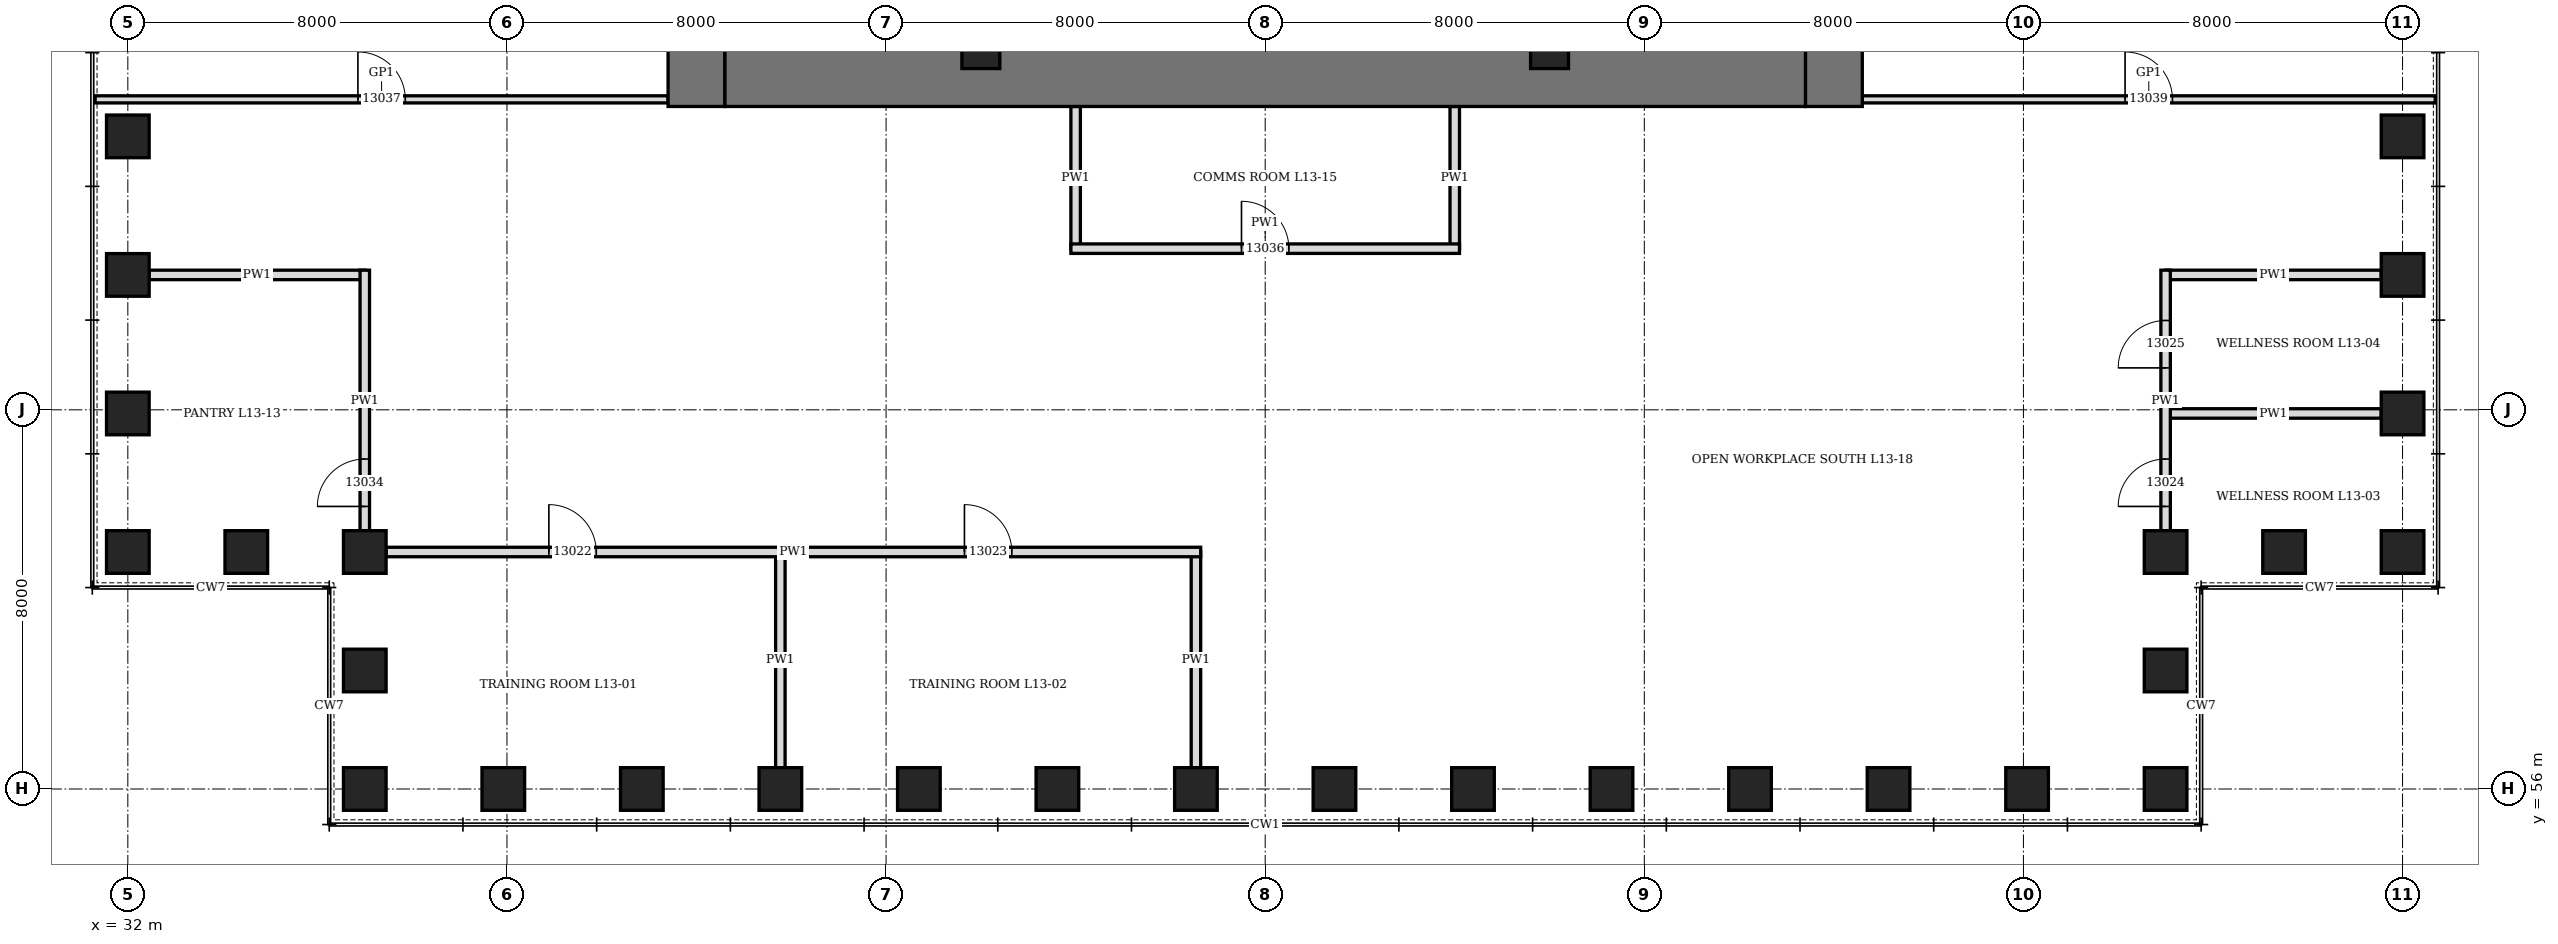
"""IFC4 building model, lengths in metres.
Left out: names, types, materials, properties, quantities, classifications, styles, units other than length and angle.
Written with IfcOpenShell. Run it as: python <this file> out.ifc"""

import sys

from ifc_helpers import new_model, si_unit, direction, frame, frame_2d, origin, origin_2d, place, context, subcontext, project, spatial, rectangle, hollow_rectangle, extrude, element, fill, save


model = new_model("IFC4")
c1 = context("Model", 3, precision=1e-05, world=origin(), true_north=direction((0.0, 1.0)))
c2 = subcontext(c1, "Body", "Model", "MODEL_VIEW")
j1 = project(units=[si_unit("LENGTHUNIT", "METRE"), si_unit("PLANEANGLEUNIT", "RADIAN")], contexts=[c1])
p1 = place(None, origin())
s1 = spatial("IfcSite", under=j1, at=p1, CompositionType="ELEMENT")
p2 = place(p1, origin())
s2 = spatial("IfcBuilding", under=s1, at=p2, CompositionType="ELEMENT")
p3 = place(p2, frame((0.0, 0.0, 64.3)))
s3 = spatial("IfcBuildingStorey", under=s2, at=p3, CompositionType="ELEMENT", Elevation=64.3)
for number, where, z_axis, x_axis in (
    (1, (37.0, 56.0, 0.0), (0.0, 0.0, 1.0), (1.0, 0.0, 0.0)),
    (2, (39.923, 56.0, 0.0), (0.0, 0.0, 1.0), (1.0, 0.0, 0.0)),
    (3, (42.846, 56.0, 0.0), (0.0, 0.0, 1.0), (1.0, 0.0, 0.0)),
    (4, (45.769, 56.0, 0.0), (0.0, 0.0, 1.0), (1.0, 0.0, 0.0)),
    (5, (48.692, 56.0, 0.0), (0.0, 0.0, 1.0), (1.0, 0.0, 0.0)),
    (6, (51.615, 56.0, 0.0), (0.0, 0.0, 1.0), (1.0, 0.0, 0.0)),
    (7, (54.539, 56.0, 0.0), (0.0, 0.0, 1.0), (1.0, 0.0, 0.0)),
    (8, (57.461, 56.0, 0.0), (0.0, 0.0, 1.0), (1.0, 0.0, 0.0)),
    (9, (60.385, 56.0, 0.0), (0.0, 0.0, 1.0), (1.0, 0.0, 0.0)),
    (10, (63.308, 56.0, 0.0), (0.0, 0.0, 1.0), (1.0, 0.0, 0.0)),
    (11, (66.231, 56.0, 0.0), (0.0, 0.0, 1.0), (1.0, 0.0, 0.0)),
    (12, (69.154, 56.0, 0.0), (0.0, 0.0, 1.0), (1.0, 0.0, 0.0)),
    (13, (72.077, 56.0, 0.0), (0.0, 0.0, 1.0), (1.0, 0.0, 0.0)),
    (14, (75.0, 56.0, 0.0), (0.0, 0.0, 1.0), (0.0, 1.0, 0.0)),
    (15, (75.0, 58.5, 0.0), (0.0, 0.0, 1.0), (0.0, 1.0, 0.0)),
    (16, (75.0, 61.0, 0.0), (0.0, 0.0, 1.0), (1.0, 0.0, 0.0)),
    (17, (77.5, 61.0, 0.0), (0.0, 0.0, 1.0), (1.0, 0.0, 0.0)),
    (18, (80.0, 61.0, 0.0), (0.0, 0.0, 1.0), (0.0, 1.0, 0.0)),
    (19, (80.0, 63.923, 0.0), (0.0, 0.0, 1.0), (0.0, 1.0, 0.0)),
    (20, (80.0, 66.846, 0.0), (0.0, 0.0, 1.0), (0.0, 1.0, 0.0)),
    (21, (80.0, 69.769, 0.0), (0.0, 0.0, 1.0), (0.0, 1.0, 0.0)),
    (22, (32.0, 69.769, 0.0), (0.0, 0.0, 1.0), (0.0, 1.0, 0.0)),
    (23, (32.0, 66.846, 0.0), (0.0, 0.0, 1.0), (0.0, 1.0, 0.0)),
    (24, (32.0, 63.923, 0.0), (0.0, 0.0, 1.0), (0.0, 1.0, 0.0)),
    (25, (32.0, 61.0, 0.0), (0.0, 0.0, 1.0), (1.0, 0.0, 0.0)),
    (26, (34.5, 61.0, 0.0), (0.0, 0.0, 1.0), (1.0, 0.0, 0.0)),
    (27, (37.0, 61.0, 0.0), (0.0, 0.0, 1.0), (0.0, 1.0, 0.0)),
    (28, (37.0, 58.5, 0.0), (0.0, 0.0, 1.0), (0.0, 1.0, 0.0)),
):
    element("IfcColumn", number, at=place(p3, frame(where, z_axis=z_axis, x_axis=x_axis)), inside=s3, PredefinedType="COLUMN", context=c2, shape_type="SweptSolid", body=[
        extrude(hollow_rectangle(XDim=0.9, YDim=0.9, WallThickness=0.12, at=origin_2d()), origin(), (0.0, 0.0, 1.0), 4.2),
    ])
p4 = place(p3, frame((44.0, 70.4, 0.0), z_axis=(0.0, 0.0, 1.0), x_axis=(0.0, 1.0, 0.0)))
e29 = element("IfcWall", 29, at=p4, inside=s3, PredefinedType="SHEAR", context=c2, shape_type="SweptSolid", body=[
    extrude(rectangle(XDim=19.2, YDim=1.2, at=frame_2d((9.6, 0.0))), origin(), (0.0, 0.0, 1.0), 4.2),
])
p5 = place(p4, frame((8.6, 0.0, 0.0)))
e30 = element("IfcOpeningElement", 30, at=p5, cuts=e29, PredefinedType="OPENING", context=c2, shape_type="SweptSolid", body=[
    extrude(rectangle(XDim=2.0, YDim=2.4, at=frame_2d((1.0, 1.2))), frame((0.0, 0.61, 0.0), z_axis=(0.0, -1.0, 0.0), x_axis=(1.0, 0.0, 0.0)), (0.0, 0.0, 1.0), 1.22),
])
p6 = place(p3, frame((68.0, 70.4, 0.0), z_axis=(0.0, 0.0, 1.0), x_axis=(0.0, 1.0, 0.0)))
e31 = element("IfcWall", 31, at=p6, inside=s3, PredefinedType="SHEAR", context=c2, shape_type="SweptSolid", body=[
    extrude(rectangle(XDim=19.2, YDim=1.2, at=frame_2d((9.6, 0.0))), origin(), (0.0, 0.0, 1.0), 4.2),
])
p7 = place(p6, frame((8.6, 0.0, 0.0)))
e32 = element("IfcOpeningElement", 32, at=p7, cuts=e31, PredefinedType="OPENING", context=c2, shape_type="SweptSolid", body=[
    extrude(rectangle(XDim=2.0, YDim=2.4, at=frame_2d((1.0, 1.2))), frame((0.0, 0.61, 0.0), z_axis=(0.0, -1.0, 0.0), x_axis=(1.0, 0.0, 0.0)), (0.0, 0.0, 1.0), 1.22),
])
p8 = place(p3, frame((44.6, 71.0, 0.0), z_axis=(0.0, 0.0, 1.0), x_axis=(1.0, 0.0, 0.0)))
e33 = element("IfcWall", 33, at=p8, inside=s3, PredefinedType="SHEAR", context=c2, shape_type="SweptSolid", body=[
    extrude(rectangle(XDim=22.8, YDim=1.2, at=frame_2d((11.4, 0.0))), origin(), (0.0, 0.0, 1.0), 4.2),
])
for number, where, z_axis, x_axis in (
    (34, (50.0, 71.6, 0.0), (0.0, 0.0, 1.0), (1.0, 0.0, 0.0)),
    (35, (62.0, 71.6, 0.0), (0.0, 0.0, 1.0), (1.0, 0.0, 0.0)),
):
    element("IfcColumn", number, at=place(p3, frame(where, z_axis=z_axis, x_axis=x_axis)), inside=s3, PredefinedType="COLUMN", context=c2, shape_type="SweptSolid", body=[
        extrude(hollow_rectangle(XDim=0.8, YDim=0.8, WallThickness=0.1, at=origin_2d()), origin(), (0.0, 0.0, 1.0), 4.2),
    ])
for number, where, z_axis, x_axis in (
    (36, (45.769, 56.45, 0.0), (0.0, 0.0, 1.0), (0.0, 1.0, 0.0)),
    (37, (54.539, 56.45, 0.0), (0.0, 0.0, 1.0), (0.0, 1.0, 0.0)),
):
    element("IfcWall", number, at=place(p3, frame(where, z_axis=z_axis, x_axis=x_axis)), inside=s3, PredefinedType="PARTITIONING", context=c2, shape_type="SweptSolid", body=[
        extrude(rectangle(XDim=4.55, YDim=0.2, at=frame_2d((2.275, 0.0))), origin(), (0.0, 0.0, 1.0), 3.278),
    ])
for number, where, z_axis, x_axis in (
    (38, (75.0, 63.923, 0.0), (0.0, 0.0, 1.0), (1.0, 0.0, 0.0)),
    (39, (75.0, 66.846, 0.0), (0.0, 0.0, 1.0), (1.0, 0.0, 0.0)),
    (40, (32.45, 66.846, 0.0), (0.0, 0.0, 1.0), (1.0, 0.0, 0.0)),
):
    element("IfcWall", number, at=place(p3, frame(where, z_axis=z_axis, x_axis=x_axis)), inside=s3, PredefinedType="PARTITIONING", context=c2, shape_type="SweptSolid", body=[
        extrude(rectangle(XDim=4.55, YDim=0.2, at=frame_2d((2.275, 0.0))), origin(), (0.0, 0.0, 1.0), 3.428),
    ])
for number, where, z_axis, x_axis in (
    (41, (52.0, 67.4, 0.0), (0.0, 0.0, 1.0), (0.0, 1.0, 0.0)),
    (42, (60.0, 67.4, 0.0), (0.0, 0.0, 1.0), (0.0, 1.0, 0.0)),
):
    element("IfcWall", number, at=place(p3, frame(where, z_axis=z_axis, x_axis=x_axis)), inside=s3, PredefinedType="PARTITIONING", context=c2, shape_type="SweptSolid", body=[
        extrude(rectangle(XDim=3.0, YDim=0.2, at=frame_2d((1.5, 0.0))), origin(), (0.0, 0.0, 1.0), 4.04),
    ])
p9 = place(p3, frame((37.45, 61.0, 0.0), z_axis=(0.0, 0.0, 1.0), x_axis=(1.0, 0.0, 0.0)))
e43 = element("IfcWall", 43, at=p9, inside=s3, PredefinedType="PARTITIONING", context=c2, shape_type="SweptSolid", body=[
    extrude(rectangle(XDim=17.188, YDim=0.2, at=frame_2d((8.594, 0.0))), origin(), (0.0, 0.0, 1.0), 4.04),
])
p10 = place(p9, frame((3.435, 0.0, 0.0)))
e44 = element("IfcOpeningElement", 44, at=p10, cuts=e43, PredefinedType="OPENING", context=c2, shape_type="SweptSolid", body=[
    extrude(rectangle(XDim=1.0, YDim=2.1, at=frame_2d((0.5, 1.05))), frame((0.0, 0.11, 0.0), z_axis=(0.0, -1.0, 0.0), x_axis=(1.0, 0.0, 0.0)), (0.0, 0.0, 1.0), 0.22),
])
p11 = place(p9, frame((12.204, 0.0, 0.0)))
e45 = element("IfcOpeningElement", 45, at=p11, cuts=e43, PredefinedType="OPENING", context=c2, shape_type="SweptSolid", body=[
    extrude(rectangle(XDim=1.0, YDim=2.1, at=frame_2d((0.5, 1.05))), frame((0.0, 0.11, 0.0), z_axis=(0.0, -1.0, 0.0), x_axis=(1.0, 0.0, 0.0)), (0.0, 0.0, 1.0), 0.22),
])
p12 = place(p3, frame((51.9, 67.4, 0.0), z_axis=(0.0, 0.0, 1.0), x_axis=(1.0, 0.0, 0.0)))
e46 = element("IfcWall", 46, at=p12, inside=s3, PredefinedType="PARTITIONING", context=c2, shape_type="SweptSolid", body=[
    extrude(rectangle(XDim=8.2, YDim=0.2, at=frame_2d((4.1, 0.0))), origin(), (0.0, 0.0, 1.0), 4.04),
])
p13 = place(p12, frame((3.6, 0.0, 0.0)))
e47 = element("IfcOpeningElement", 47, at=p13, cuts=e46, PredefinedType="OPENING", context=c2, shape_type="SweptSolid", body=[
    extrude(rectangle(XDim=1.0, YDim=2.1, at=frame_2d((0.5, 1.05))), frame((0.0, 0.11, 0.0), z_axis=(0.0, -1.0, 0.0), x_axis=(1.0, 0.0, 0.0)), (0.0, 0.0, 1.0), 0.22),
])
p14 = place(p3, frame((31.31, 70.55, 0.0), z_axis=(0.0, 0.0, 1.0), x_axis=(1.0, 0.0, 0.0)))
e48 = element("IfcWall", 48, at=p14, inside=s3, PredefinedType="PARTITIONING", context=c2, shape_type="SweptSolid", body=[
    extrude(rectangle(XDim=12.09, YDim=0.15, at=frame_2d((6.045, 0.0))), origin(), (0.0, 0.0, 1.0), 4.04),
])
p15 = place(p14, frame((5.545, 0.0, 0.0)))
e49 = element("IfcOpeningElement", 49, at=p15, cuts=e48, PredefinedType="OPENING", context=c2, shape_type="SweptSolid", body=[
    extrude(rectangle(XDim=1.0, YDim=2.4, at=frame_2d((0.5, 1.2))), frame((0.0, 0.085, 0.0), z_axis=(0.0, -1.0, 0.0), x_axis=(1.0, 0.0, 0.0)), (0.0, 0.0, 1.0), 0.17),
])
p16 = place(p3, frame((68.6, 70.55, 0.0), z_axis=(0.0, 0.0, 1.0), x_axis=(1.0, 0.0, 0.0)))
e50 = element("IfcWall", 50, at=p16, inside=s3, PredefinedType="PARTITIONING", context=c2, shape_type="SweptSolid", body=[
    extrude(rectangle(XDim=12.09, YDim=0.15, at=frame_2d((6.045, 0.0))), origin(), (0.0, 0.0, 1.0), 4.04),
])
p17 = place(p16, frame((5.545, 0.0, 0.0)))
e51 = element("IfcOpeningElement", 51, at=p17, cuts=e50, PredefinedType="OPENING", context=c2, shape_type="SweptSolid", body=[
    extrude(rectangle(XDim=1.0, YDim=2.4, at=frame_2d((0.5, 1.2))), frame((0.0, 0.085, 0.0), z_axis=(0.0, -1.0, 0.0), x_axis=(1.0, 0.0, 0.0)), (0.0, 0.0, 1.0), 0.17),
])
p18 = place(p3, frame((37.0, 61.45, 0.0), z_axis=(0.0, 0.0, 1.0), x_axis=(0.0, 1.0, 0.0)))
e52 = element("IfcWall", 52, at=p18, inside=s3, PredefinedType="PARTITIONING", context=c2, shape_type="SweptSolid", body=[
    extrude(rectangle(XDim=5.496, YDim=0.2, at=frame_2d((2.748, 0.0))), origin(), (0.0, 0.0, 1.0), 4.04),
])
p19 = place(p18, frame((0.511, 0.0, 0.0)))
e53 = element("IfcOpeningElement", 53, at=p19, cuts=e52, PredefinedType="OPENING", context=c2, shape_type="SweptSolid", body=[
    extrude(rectangle(XDim=1.0, YDim=2.1, at=frame_2d((0.5, 1.05))), frame((0.0, 0.11, 0.0), z_axis=(0.0, -1.0, 0.0), x_axis=(1.0, 0.0, 0.0)), (0.0, 0.0, 1.0), 0.22),
])
p20 = place(p3, frame((75.0, 61.45, 0.0), z_axis=(0.0, 0.0, 1.0), x_axis=(0.0, 1.0, 0.0)))
e54 = element("IfcWall", 54, at=p20, inside=s3, PredefinedType="PARTITIONING", context=c2, shape_type="SweptSolid", body=[
    extrude(rectangle(XDim=5.496, YDim=0.2, at=frame_2d((2.748, 0.0))), origin(), (0.0, 0.0, 1.0), 4.04),
])
p21 = place(p20, frame((0.511, 0.0, 0.0)))
e55 = element("IfcOpeningElement", 55, at=p21, cuts=e54, PredefinedType="OPENING", context=c2, shape_type="SweptSolid", body=[
    extrude(rectangle(XDim=1.0, YDim=2.1, at=frame_2d((0.5, 1.05))), frame((0.0, 0.11, 0.0), z_axis=(0.0, -1.0, 0.0), x_axis=(1.0, 0.0, 0.0)), (0.0, 0.0, 1.0), 0.22),
])
p22 = place(p20, frame((3.435, 0.0, 0.0)))
e56 = element("IfcOpeningElement", 56, at=p22, cuts=e54, PredefinedType="OPENING", context=c2, shape_type="SweptSolid", body=[
    extrude(rectangle(XDim=1.0, YDim=2.1, at=frame_2d((0.5, 1.05))), frame((0.0, 0.11, 0.0), z_axis=(0.0, -1.0, 0.0), x_axis=(1.0, 0.0, 0.0)), (0.0, 0.0, 1.0), 0.22),
])
p23 = place(p10, origin())
e57 = element("IfcDoor", 57, at=p23, inside=s3, OperationType="SINGLE_SWING_LEFT", PredefinedType="DOOR", context=c2, shape_type="SweptSolid", body=[
    extrude(rectangle(XDim=1.0, YDim=2.1, at=frame_2d((0.5, 1.05))), frame((0.0, 0.1, 0.0), z_axis=(0.0, -1.0, 0.0), x_axis=(1.0, 0.0, 0.0)), (0.0, 0.0, 1.0), 0.199),
])
fill(e44, e57)
p24 = place(p11, origin())
e58 = element("IfcDoor", 58, at=p24, inside=s3, OperationType="SINGLE_SWING_LEFT", PredefinedType="DOOR", context=c2, shape_type="SweptSolid", body=[
    extrude(rectangle(XDim=1.0, YDim=2.1, at=frame_2d((0.5, 1.05))), frame((0.0, 0.1, 0.0), z_axis=(0.0, -1.0, 0.0), x_axis=(1.0, 0.0, 0.0)), (0.0, 0.0, 1.0), 0.199),
])
fill(e45, e58)
p25 = place(p21, origin())
e59 = element("IfcDoor", 59, at=p25, inside=s3, OperationType="SINGLE_SWING_LEFT", PredefinedType="DOOR", context=c2, shape_type="SweptSolid", body=[
    extrude(rectangle(XDim=1.0, YDim=2.1, at=frame_2d((0.5, 1.05))), frame((0.0, 0.1, 0.0), z_axis=(0.0, -1.0, 0.0), x_axis=(1.0, 0.0, 0.0)), (0.0, 0.0, 1.0), 0.199),
])
fill(e55, e59)
p26 = place(p22, origin())
e60 = element("IfcDoor", 60, at=p26, inside=s3, OperationType="SINGLE_SWING_LEFT", PredefinedType="DOOR", context=c2, shape_type="SweptSolid", body=[
    extrude(rectangle(XDim=1.0, YDim=2.1, at=frame_2d((0.5, 1.05))), frame((0.0, 0.1, 0.0), z_axis=(0.0, -1.0, 0.0), x_axis=(1.0, 0.0, 0.0)), (0.0, 0.0, 1.0), 0.199),
])
fill(e56, e60)
p27 = place(p19, origin())
e61 = element("IfcDoor", 61, at=p27, inside=s3, OperationType="SINGLE_SWING_LEFT", PredefinedType="DOOR", context=c2, shape_type="SweptSolid", body=[
    extrude(rectangle(XDim=1.0, YDim=2.1, at=frame_2d((0.5, 1.05))), frame((0.0, 0.1, 0.0), z_axis=(0.0, -1.0, 0.0), x_axis=(1.0, 0.0, 0.0)), (0.0, 0.0, 1.0), 0.199),
])
fill(e53, e61)
p28 = place(p13, origin())
e62 = element("IfcDoor", 62, at=p28, inside=s3, OperationType="SINGLE_SWING_LEFT", PredefinedType="DOOR", context=c2, shape_type="SweptSolid", body=[
    extrude(rectangle(XDim=1.0, YDim=2.1, at=frame_2d((0.5, 1.05))), frame((0.0, 0.1, 0.0), z_axis=(0.0, -1.0, 0.0), x_axis=(1.0, 0.0, 0.0)), (0.0, 0.0, 1.0), 0.199),
])
fill(e47, e62)
p29 = place(p15, origin())
e63 = element("IfcDoor", 63, at=p29, inside=s3, OperationType="SINGLE_SWING_RIGHT", PredefinedType="DOOR", context=c2, shape_type="SweptSolid", body=[
    extrude(rectangle(XDim=1.0, YDim=2.4, at=frame_2d((0.5, 1.2))), frame((0.0, 0.075, 0.0), z_axis=(0.0, -1.0, 0.0), x_axis=(1.0, 0.0, 0.0)), (0.0, 0.0, 1.0), 0.149),
])
fill(e49, e63)
p30 = place(p17, origin())
e64 = element("IfcDoor", 64, at=p30, inside=s3, OperationType="SINGLE_SWING_RIGHT", PredefinedType="DOOR", context=c2, shape_type="SweptSolid", body=[
    extrude(rectangle(XDim=1.0, YDim=2.4, at=frame_2d((0.5, 1.2))), frame((0.0, 0.075, 0.0), z_axis=(0.0, -1.0, 0.0), x_axis=(1.0, 0.0, 0.0)), (0.0, 0.0, 1.0), 0.149),
])
fill(e51, e64)
save(model, sys.argv[1])
